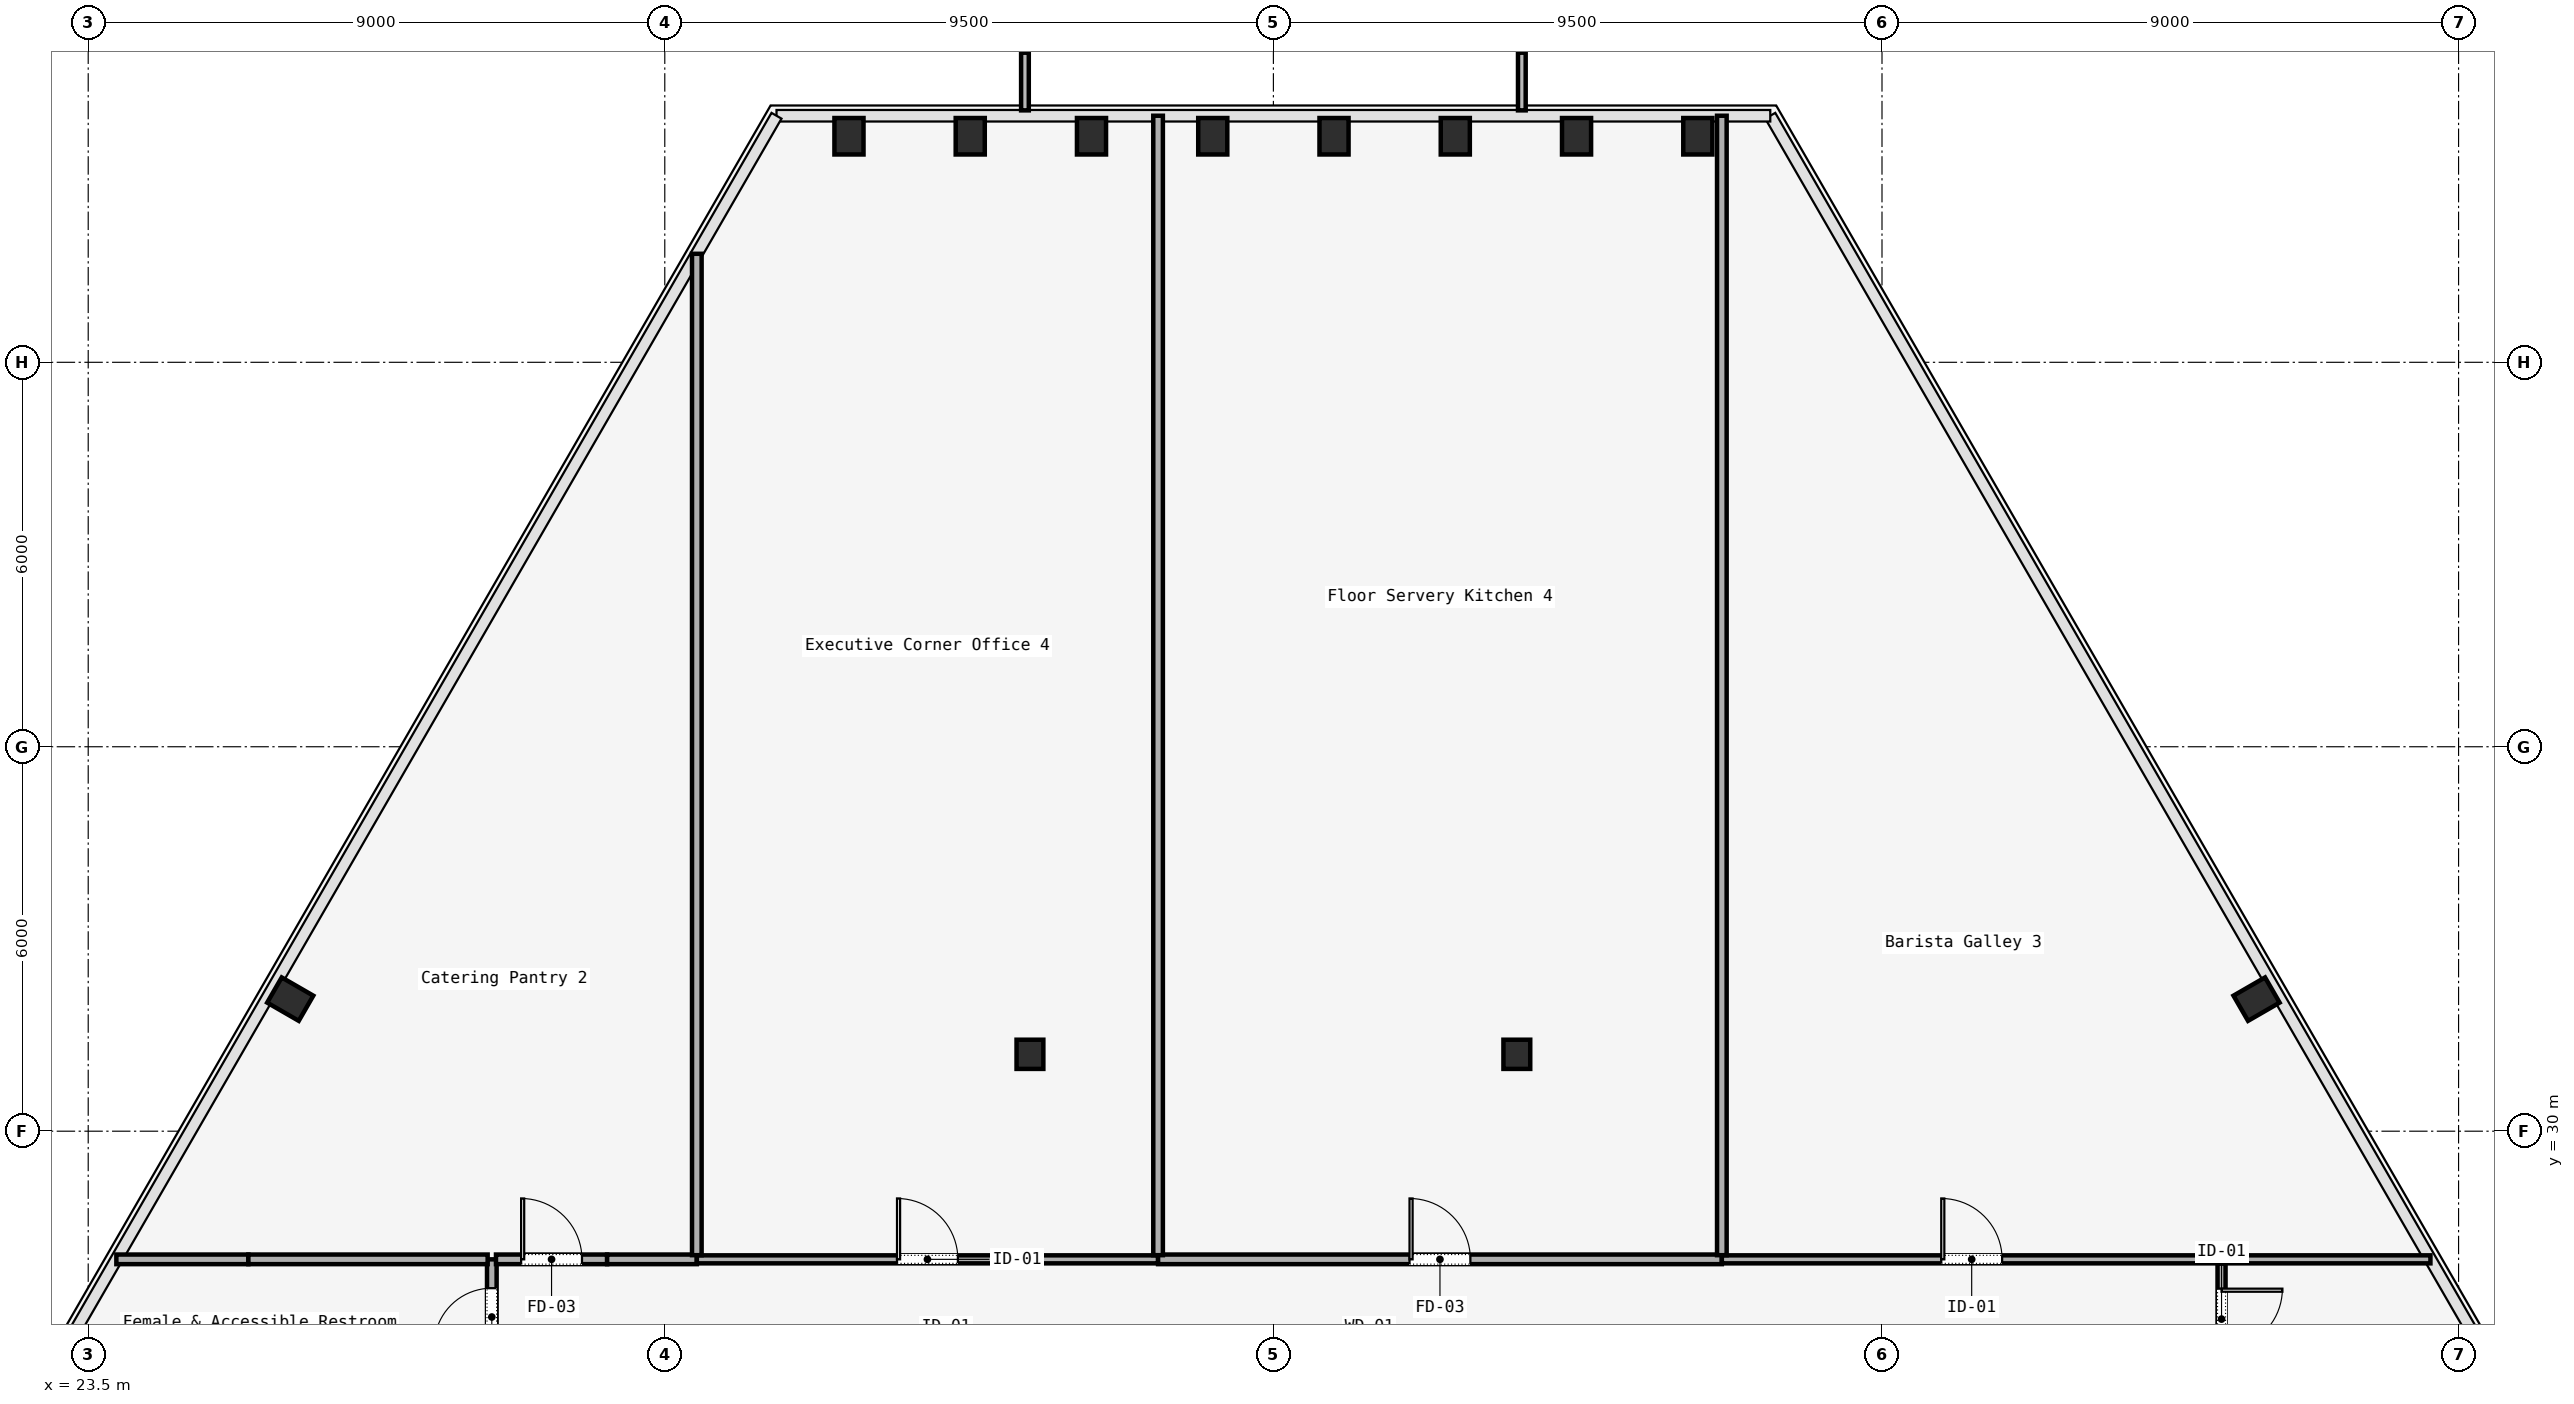
"""IFC4 building model, lengths in metres.
Left out: names, types, materials, properties, quantities, classifications, styles, units other than length and angle.
Written with IfcOpenShell. Run it as: python <this file> out.ifc"""

import sys

from ifc_helpers import new_model, si_unit, direction, frame, frame_2d, origin, origin_2d, place, context, subcontext, project, spatial, rectangle, i_section, extrude, element, fill, save


model = new_model("IFC4")
c1 = context("Model", 3, precision=1e-05, world=origin(), true_north=direction((0.0, 1.0)))
c2 = subcontext(c1, "Body", "Model", "MODEL_VIEW")
j1 = project(units=[si_unit("LENGTHUNIT", "METRE"), si_unit("PLANEANGLEUNIT", "RADIAN")], contexts=[c1])
p1 = place(None, origin())
s1 = spatial("IfcSite", under=j1, at=p1, CompositionType="ELEMENT")
p2 = place(p1, origin())
s2 = spatial("IfcBuilding", under=s1, at=p2, CompositionType="ELEMENT")
p3 = place(p2, frame((0.0, 0.0, 58.8)))
s3 = spatial("IfcBuildingStorey", under=s2, at=p3, CompositionType="ELEMENT", Elevation=58.8)
for number, where, z_axis, x_axis in (
    (1, (38.2, 31.2, 0.0), (0.0, 0.0, 1.0), (1.0, 0.0, 0.0)),
    (2, (45.8, 31.2, 0.0), (0.0, 0.0, 1.0), (1.0, 0.0, 0.0)),
):
    element("IfcColumn", number, at=place(p3, frame(where, z_axis=z_axis, x_axis=x_axis)), inside=s3, PredefinedType="COLUMN", context=c2, shape_type="SweptSolid", body=[
        extrude(i_section(OverallWidth=0.418, OverallDepth=0.456, WebThickness=0.042, FlangeThickness=0.067, FilletRadius=0.015, at=origin_2d()), origin(), (0.0, 0.0, 1.0), 3.58),
    ])
for number, where, z_axis, x_axis in (
    (3, (57.346, 32.061, 0.0), (0.0, 0.0, 1.0), (-0.5, 0.866, 0.0)),
    (4, (48.625, 45.528, 0.0), (0.0, 0.0, 1.0), (1.0, 0.0, 0.0)),
    (5, (46.732, 45.528, 0.0), (0.0, 0.0, 1.0), (1.0, 0.0, 0.0)),
    (6, (44.839, 45.528, 0.0), (0.0, 0.0, 1.0), (1.0, 0.0, 0.0)),
    (7, (42.946, 45.528, 0.0), (0.0, 0.0, 1.0), (1.0, 0.0, 0.0)),
    (8, (41.054, 45.528, 0.0), (0.0, 0.0, 1.0), (1.0, 0.0, 0.0)),
    (9, (39.161, 45.528, 0.0), (0.0, 0.0, 1.0), (1.0, 0.0, 0.0)),
    (10, (37.268, 45.528, 0.0), (0.0, 0.0, 1.0), (1.0, 0.0, 0.0)),
    (11, (35.375, 45.528, 0.0), (0.0, 0.0, 1.0), (1.0, 0.0, 0.0)),
    (12, (26.654, 32.061, 0.0), (0.0, 0.0, 1.0), (0.5, 0.866, 0.0)),
):
    element("IfcColumn", number, at=place(p3, frame(where, z_axis=z_axis, x_axis=x_axis)), inside=s3, PredefinedType="COLUMN", context=c2, shape_type="SweptSolid", body=[
        extrude(i_section(OverallWidth=0.454, OverallDepth=0.569, WebThickness=0.078, FlangeThickness=0.08, FilletRadius=0.015, at=origin_2d()), origin(), (0.0, 0.0, 1.0), 3.58),
    ])
p4 = place(p3, frame((29.8, 26.2, 0.0), z_axis=(0.0, 0.0, 1.0), x_axis=(0.0, 1.0, 0.0)))
e13 = element("IfcWall", 13, at=p4, inside=s3, PredefinedType="PARTITIONING", context=c2, shape_type="SweptSolid", body=[
    extrude(rectangle(XDim=1.8, YDim=0.15, at=frame_2d((0.9, 0.0))), origin(), (0.0, 0.0, 1.0), 2.933),
])
p5 = place(p4, frame((0.45, 0.0, 0.0)))
e14 = element("IfcOpeningElement", 14, at=p5, cuts=e13, PredefinedType="OPENING", context=c2, shape_type="SweptSolid", body=[
    extrude(rectangle(XDim=0.9, YDim=2.15, at=frame_2d((0.45, 1.075))), frame((0.0, 0.075, 0.0), z_axis=(0.0, -1.0, 0.0), x_axis=(1.0, 0.0, 0.0)), (0.0, 0.0, 1.0), 0.15),
])
p6 = place(p3, frame((29.865, 28.0, 0.0), z_axis=(0.0, 0.0, 1.0), x_axis=(1.0, 0.0, 0.0)))
e15 = element("IfcWall", 15, at=p6, inside=s3, PredefinedType="PARTITIONING", context=c2, shape_type="SweptSolid", body=[
    extrude(rectangle(XDim=1.735, YDim=0.15, at=frame_2d((0.868, 0.0))), origin(), (0.0, 0.0, 1.0), 2.933),
])
p7 = place(p6, frame((0.393, 0.0, 0.0)))
e16 = element("IfcOpeningElement", 16, at=p7, cuts=e15, PredefinedType="OPENING", context=c2, shape_type="SweptSolid", body=[
    extrude(rectangle(XDim=0.95, YDim=2.2, at=frame_2d((0.475, 1.1))), frame((0.0, 0.075, 0.0), z_axis=(0.0, -1.0, 0.0), x_axis=(1.0, 0.0, 0.0)), (0.0, 0.0, 1.0), 0.15),
])
p8 = place(p3, frame((31.6, 28.0, 0.0), z_axis=(0.0, 0.0, 1.0), x_axis=(1.0, 0.0, 0.0)))
e17 = element("IfcWall", 17, at=p8, inside=s3, PredefinedType="PARTITIONING", context=c2, shape_type="SweptSolid", body=[
    extrude(rectangle(XDim=1.4, YDim=0.15, at=frame_2d((0.7, 0.0))), origin(), (0.0, 0.0, 1.0), 2.933),
])
p9 = place(p3, frame((33.0, 28.0, 0.0), z_axis=(0.0, 0.0, 1.0), x_axis=(1.0, 0.0, 0.0)))
e18 = element("IfcWall", 18, at=p9, inside=s3, PredefinedType="PARTITIONING", context=c2, shape_type="SweptSolid", body=[
    extrude(rectangle(XDim=7.2, YDim=0.125, at=frame_2d((3.6, 0.0))), origin(), (0.0, 0.0, 1.0), 2.933),
])
p10 = place(p9, frame((3.125, 0.0, 0.0)))
e19 = element("IfcOpeningElement", 19, at=p10, cuts=e18, PredefinedType="OPENING", context=c2, shape_type="SweptSolid", body=[
    extrude(rectangle(XDim=0.95, YDim=2.2, at=frame_2d((0.475, 1.1))), frame((0.0, 0.062, 0.0), z_axis=(0.0, -1.0, 0.0), x_axis=(1.0, 0.0, 0.0)), (0.0, 0.0, 1.0), 0.125),
])
p11 = place(p3, frame((40.2, 28.0, 0.0), z_axis=(0.0, 0.0, 1.0), x_axis=(1.0, 0.0, 0.0)))
e20 = element("IfcWall", 20, at=p11, inside=s3, PredefinedType="PARTITIONING", context=c2, shape_type="SweptSolid", body=[
    extrude(rectangle(XDim=8.8, YDim=0.15, at=frame_2d((4.4, 0.0))), origin(), (0.0, 0.0, 1.0), 2.933),
])
p12 = place(p11, frame((3.925, 0.0, 0.0)))
e21 = element("IfcOpeningElement", 21, at=p12, cuts=e20, PredefinedType="OPENING", context=c2, shape_type="SweptSolid", body=[
    extrude(rectangle(XDim=0.95, YDim=2.2, at=frame_2d((0.475, 1.1))), frame((0.0, 0.075, 0.0), z_axis=(0.0, -1.0, 0.0), x_axis=(1.0, 0.0, 0.0)), (0.0, 0.0, 1.0), 0.15),
])
p13 = place(p3, frame((49.0, 28.0, 0.0), z_axis=(0.0, 0.0, 1.0), x_axis=(1.0, 0.0, 0.0)))
e22 = element("IfcWall", 22, at=p13, inside=s3, PredefinedType="PARTITIONING", context=c2, shape_type="SweptSolid", body=[
    extrude(rectangle(XDim=7.8, YDim=0.125, at=frame_2d((3.9, 0.0))), origin(), (0.0, 0.0, 1.0), 2.933),
])
p14 = place(p13, frame((3.425, 0.0, 0.0)))
e23 = element("IfcOpeningElement", 23, at=p14, cuts=e22, PredefinedType="OPENING", context=c2, shape_type="SweptSolid", body=[
    extrude(rectangle(XDim=0.95, YDim=2.2, at=frame_2d((0.475, 1.1))), frame((0.0, 0.062, 0.0), z_axis=(0.0, -1.0, 0.0), x_axis=(1.0, 0.0, 0.0)), (0.0, 0.0, 1.0), 0.125),
])
p15 = place(p3, frame((56.8, 27.935, 0.0), z_axis=(0.0, 0.0, 1.0), x_axis=(0.0, -1.0, 0.0)))
e24 = element("IfcWall", 24, at=p15, inside=s3, PredefinedType="PARTITIONING", context=c2, shape_type="SweptSolid", body=[
    extrude(rectangle(XDim=1.735, YDim=0.125, at=frame_2d((0.868, 0.0))), origin(), (0.0, 0.0, 1.0), 2.933),
])
p16 = place(p15, frame((0.393, 0.0, 0.0)))
e25 = element("IfcOpeningElement", 25, at=p16, cuts=e24, PredefinedType="OPENING", context=c2, shape_type="SweptSolid", body=[
    extrude(rectangle(XDim=0.95, YDim=2.2, at=frame_2d((0.475, 1.1))), frame((0.0, 0.062, 0.0), z_axis=(0.0, -1.0, 0.0), x_axis=(1.0, 0.0, 0.0)), (0.0, 0.0, 1.0), 0.125),
])
p17 = place(p3, frame((56.8, 28.0, 0.0), z_axis=(0.0, 0.0, 1.0), x_axis=(1.0, 0.0, 0.0)))
e26 = element("IfcWall", 26, at=p17, inside=s3, PredefinedType="PARTITIONING", context=c2, shape_type="SweptSolid", body=[
    extrude(rectangle(XDim=3.26, YDim=0.125, at=frame_2d((1.63, 0.0))), origin(), (0.0, 0.0, 1.0), 2.933),
])
p18 = place(p3, frame((23.939, 28.0, 0.0), z_axis=(0.0, 0.0, 1.0), x_axis=(1.0, 0.0, 0.0)))
e27 = element("IfcWall", 27, at=p18, inside=s3, PredefinedType="PARTITIONING", context=c2, shape_type="SweptSolid", body=[
    extrude(rectangle(XDim=2.061, YDim=0.15, at=frame_2d((1.03, 0.0))), origin(), (0.0, 0.0, 1.0), 2.933),
])
p19 = place(p3, frame((26.0, 28.0, 0.0), z_axis=(0.0, 0.0, 1.0), x_axis=(1.0, 0.0, 0.0)))
e28 = element("IfcWall", 28, at=p19, inside=s3, PredefinedType="PARTITIONING", context=c2, shape_type="SweptSolid", body=[
    extrude(rectangle(XDim=3.735, YDim=0.15, at=frame_2d((1.868, 0.0))), origin(), (0.0, 0.0, 1.0), 2.933),
])
p20 = place(p3, frame((33.0, 43.693, 0.0), z_axis=(0.0, 0.0, 1.0), x_axis=(0.0, -1.0, 0.0)))
e29 = element("IfcWall", 29, at=p20, inside=s3, PredefinedType="PARTITIONING", context=c2, shape_type="SweptSolid", body=[
    extrude(rectangle(XDim=15.628, YDim=0.15, at=frame_2d((7.814, 0.0))), origin(), (0.0, 0.0, 1.0), 2.933),
])
for number, where, z_axis, x_axis in (
    (30, (49.0, 28.065, 0.0), (0.0, 0.0, 1.0), (0.0, 1.0, 0.0)),
    (31, (40.2, 45.848, 0.0), (0.0, 0.0, 1.0), (0.0, -1.0, 0.0)),
):
    element("IfcWall", number, at=place(p3, frame(where, z_axis=z_axis, x_axis=x_axis)), inside=s3, PredefinedType="PARTITIONING", context=c2, shape_type="SweptSolid", body=[
        extrude(rectangle(XDim=17.783, YDim=0.15, at=frame_2d((8.892, 0.0))), origin(), (0.0, 0.0, 1.0), 2.933),
    ])
p21 = place(p16, origin())
e32 = element("IfcDoor", 32, at=p21, inside=s3, OperationType="SINGLE_SWING_LEFT", PredefinedType="DOOR", context=c2, shape_type="SweptSolid", body=[
    extrude(rectangle(XDim=0.95, YDim=2.2, at=frame_2d((0.475, 1.1))), frame((0.0, 0.025, 0.0), z_axis=(0.0, -1.0, 0.0), x_axis=(1.0, 0.0, 0.0)), (0.0, 0.0, 1.0), 0.05),
])
fill(e25, e32)
p22 = place(p5, origin())
e33 = element("IfcDoor", 33, at=p22, inside=s3, OperationType="SINGLE_SWING_RIGHT", PredefinedType="DOOR", context=c2, shape_type="SweptSolid", body=[
    extrude(rectangle(XDim=0.9, YDim=2.15, at=frame_2d((0.45, 1.075))), frame((0.0, 0.025, 0.0), z_axis=(0.0, -1.0, 0.0), x_axis=(1.0, 0.0, 0.0)), (0.0, 0.0, 1.0), 0.05),
])
fill(e14, e33)
p23 = place(p7, origin())
e34 = element("IfcDoor", 34, at=p23, inside=s3, OperationType="SINGLE_SWING_LEFT", PredefinedType="DOOR", context=c2, shape_type="SweptSolid", body=[
    extrude(rectangle(XDim=0.95, YDim=2.2, at=frame_2d((0.475, 1.1))), frame((0.0, 0.025, 0.0), z_axis=(0.0, -1.0, 0.0), x_axis=(1.0, 0.0, 0.0)), (0.0, 0.0, 1.0), 0.05),
])
fill(e16, e34)
p24 = place(p14, origin())
e35 = element("IfcDoor", 35, at=p24, inside=s3, OperationType="SINGLE_SWING_RIGHT", PredefinedType="DOOR", context=c2, shape_type="SweptSolid", body=[
    extrude(rectangle(XDim=0.95, YDim=2.2, at=frame_2d((0.475, 1.1))), frame((0.0, 0.025, 0.0), z_axis=(0.0, -1.0, 0.0), x_axis=(1.0, 0.0, 0.0)), (0.0, 0.0, 1.0), 0.05),
])
fill(e23, e35)
p25 = place(p10, origin())
e36 = element("IfcDoor", 36, at=p25, inside=s3, OperationType="SINGLE_SWING_LEFT", PredefinedType="DOOR", context=c2, shape_type="SweptSolid", body=[
    extrude(rectangle(XDim=0.95, YDim=2.2, at=frame_2d((0.475, 1.1))), frame((0.0, 0.025, 0.0), z_axis=(0.0, -1.0, 0.0), x_axis=(1.0, 0.0, 0.0)), (0.0, 0.0, 1.0), 0.05),
])
fill(e19, e36)
p26 = place(p12, origin())
e37 = element("IfcDoor", 37, at=p26, inside=s3, OperationType="SINGLE_SWING_RIGHT", PredefinedType="DOOR", context=c2, shape_type="SweptSolid", body=[
    extrude(rectangle(XDim=0.95, YDim=2.2, at=frame_2d((0.475, 1.1))), frame((0.0, 0.025, 0.0), z_axis=(0.0, -1.0, 0.0), x_axis=(1.0, 0.0, 0.0)), (0.0, 0.0, 1.0), 0.05),
])
fill(e21, e37)
save(model, sys.argv[1])
